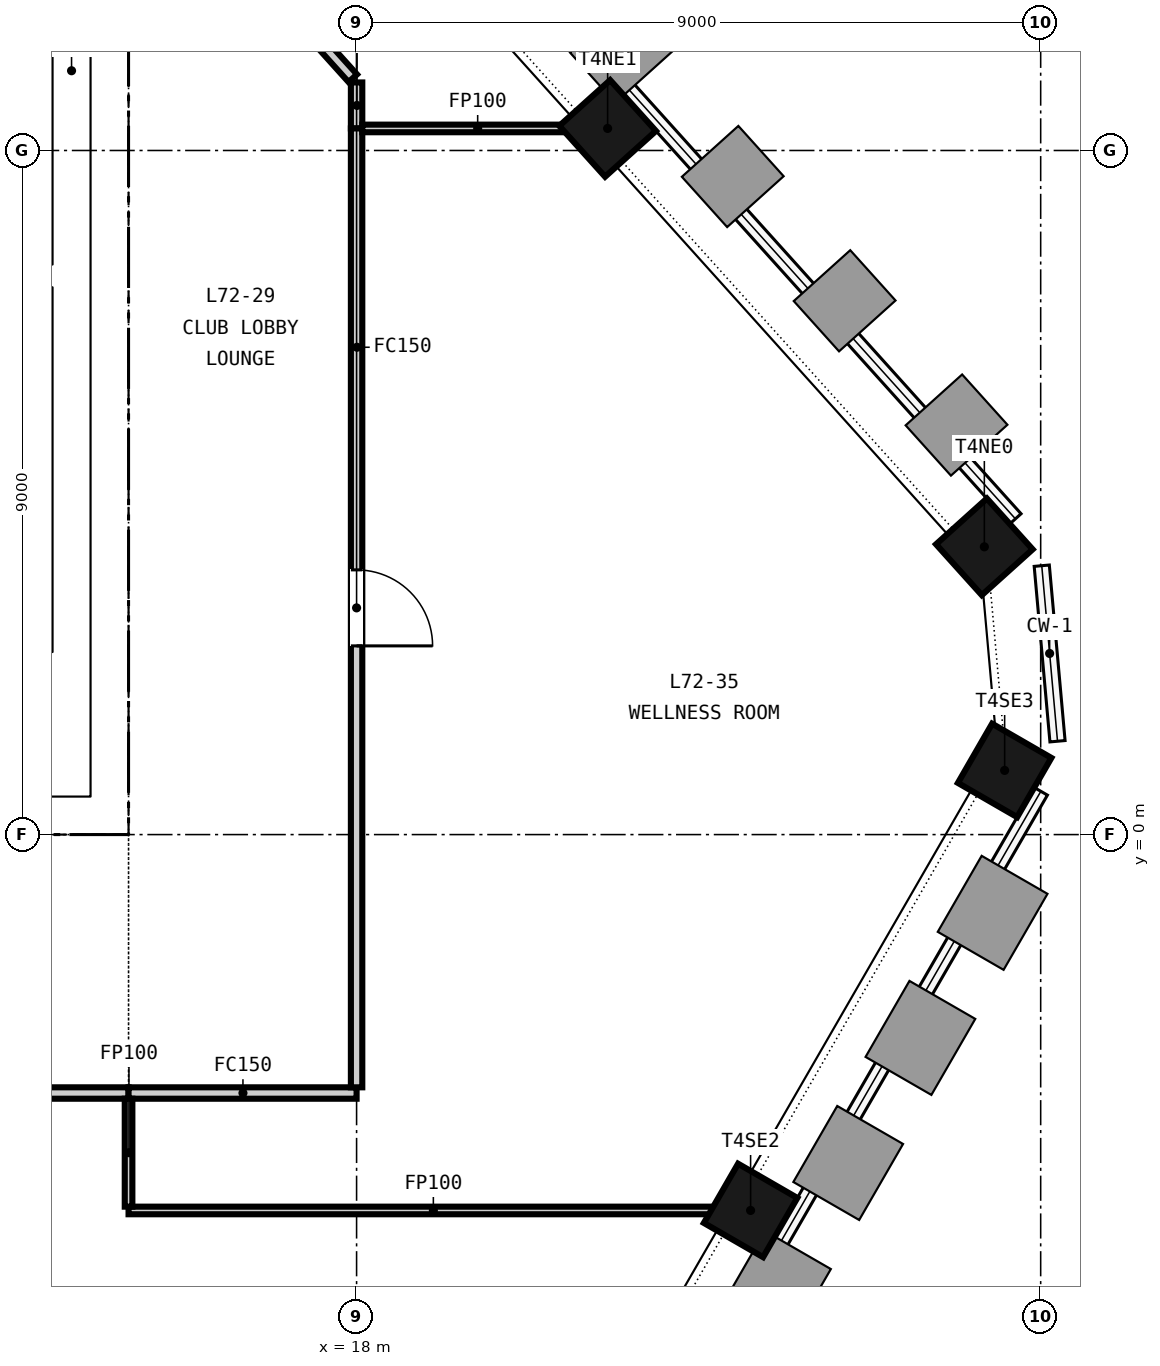
"""IFC4 building model, lengths in metres.
Left out: names, types, materials, properties, quantities, classifications, styles, units other than length and angle.
Written with IfcOpenShell. Run it as: python <this file> out.ifc"""

import sys

from ifc_helpers import new_model, si_unit, direction, frame, frame_2d, origin, origin_2d, place, context, subcontext, project, spatial, rectangle, extrude, element, fill, save


model = new_model("IFC4")
c1 = context("Model", 3, precision=1e-05, world=origin(), true_north=direction((0.0, 1.0)))
c2 = subcontext(c1, "Body", "Model", "MODEL_VIEW")
j1 = project(units=[si_unit("LENGTHUNIT", "METRE"), si_unit("PLANEANGLEUNIT", "RADIAN")], contexts=[c1])
p1 = place(None, origin())
s1 = spatial("IfcSite", under=j1, at=p1, CompositionType="ELEMENT")
p2 = place(p1, origin())
s2 = spatial("IfcBuilding", under=s1, at=p2, CompositionType="ELEMENT")
p3 = place(p2, frame((0.0, 0.0, 282.85)))
s3 = spatial("IfcBuildingStorey", under=s2, at=p3, CompositionType="ELEMENT", Elevation=282.85)
p4 = place(p3, frame((-15.0, 0.25, -0.15), z_axis=(0.0, 0.0, 1.0), x_axis=(1.0, 0.0, 0.0)))
e1 = element("IfcWall", 1, at=p4, inside=s3, PredefinedType="SOLIDWALL", context=c2, shape_type="SweptSolid", body=[
    extrude(rectangle(XDim=30.0, YDim=0.5, at=frame_2d((15.0, 0.0))), origin(), (0.0, 0.0, 1.0), 3.65),
])
p5 = place(p4, frame((5.8, 0.0, 0.15)))
e2 = element("IfcOpeningElement", 2, at=p5, cuts=e1, PredefinedType="OPENING", context=c2, shape_type="SweptSolid", body=[
    extrude(rectangle(XDim=2.4, YDim=2.4, at=frame_2d((1.2, 1.2))), frame((0.0, 0.26, 0.0), z_axis=(0.0, -1.0, 0.0), x_axis=(1.0, 0.0, 0.0)), (0.0, 0.0, 1.0), 0.52),
])
p6 = place(p4, frame((13.8, 0.0, 0.15)))
e3 = element("IfcOpeningElement", 3, at=p6, cuts=e1, PredefinedType="OPENING", context=c2, shape_type="SweptSolid", body=[
    extrude(rectangle(XDim=2.4, YDim=2.4, at=frame_2d((1.2, 1.2))), frame((0.0, 0.26, 0.0), z_axis=(0.0, -1.0, 0.0), x_axis=(1.0, 0.0, 0.0)), (0.0, 0.0, 1.0), 0.52),
])
p7 = place(p4, frame((21.8, 0.0, 0.15)))
e4 = element("IfcOpeningElement", 4, at=p7, cuts=e1, PredefinedType="OPENING", context=c2, shape_type="SweptSolid", body=[
    extrude(rectangle(XDim=2.4, YDim=2.4, at=frame_2d((1.2, 1.2))), frame((0.0, 0.26, 0.0), z_axis=(0.0, -1.0, 0.0), x_axis=(1.0, 0.0, 0.0)), (0.0, 0.0, 1.0), 0.52),
])
p8 = place(p4, frame((1.5, 0.0, 0.15)))
e5 = element("IfcOpeningElement", 5, at=p8, cuts=e1, PredefinedType="OPENING", context=c2, shape_type="SweptSolid", body=[
    extrude(rectangle(XDim=1.2, YDim=2.1, at=frame_2d((0.6, 1.05))), frame((0.0, 0.26, 0.0), z_axis=(0.0, -1.0, 0.0), x_axis=(1.0, 0.0, 0.0)), (0.0, 0.0, 1.0), 0.52),
])
p9 = place(p4, frame((27.3, 0.0, 0.15)))
e6 = element("IfcOpeningElement", 6, at=p9, cuts=e1, PredefinedType="OPENING", context=c2, shape_type="SweptSolid", body=[
    extrude(rectangle(XDim=1.2, YDim=2.1, at=frame_2d((0.6, 1.05))), frame((0.0, 0.26, 0.0), z_axis=(0.0, -1.0, 0.0), x_axis=(1.0, 0.0, 0.0)), (0.0, 0.0, 1.0), 0.52),
])
p10 = place(p3, frame((14.75, 0.5, -0.15), z_axis=(0.0, 0.0, 1.0), x_axis=(0.0, 1.0, 0.0)))
e7 = element("IfcWall", 7, at=p10, inside=s3, PredefinedType="SOLIDWALL", context=c2, shape_type="SweptSolid", body=[
    extrude(rectangle(XDim=14.0, YDim=0.5, at=frame_2d((7.0, 0.0))), origin(), (0.0, 0.0, 1.0), 3.65),
])
for number, where, z_axis, x_axis in (
    (8, (23.184, -4.945, -0.15), (0.0, 0.0, 1.0), (0.5, 0.866, 0.0)),
    (9, (26.526, 0.844, -0.15), (0.0, 0.0, 1.0), (0.5, 0.866, 0.0)),
    (10, (26.259, 3.786, -0.15), (0.0, 0.0, 1.0), (-0.669, 0.743, 0.0)),
    (11, (21.303, 9.29, -0.15), (0.0, 0.0, 1.0), (-0.669, 0.743, 0.0)),
):
    element("IfcColumn", number, at=place(p3, frame(where, z_axis=z_axis, x_axis=x_axis)), inside=s3, PredefinedType="COLUMN", context=c2, shape_type="SweptSolid", body=[
        extrude(rectangle(XDim=0.9, YDim=0.9, at=origin_2d()), origin(), (0.0, 0.0, 1.0), 3.65),
    ])
p11 = place(p3, frame((11.05, 7.35, 0.0), z_axis=(0.0, 0.0, 1.0), x_axis=(1.0, 0.0, 0.0)))
e12 = element("IfcWall", 12, at=p11, inside=s3, PredefinedType="SOLIDWALL", context=c2, shape_type="SweptSolid", body=[
    extrude(rectangle(XDim=2.95, YDim=0.3, at=frame_2d((1.475, 0.0))), origin(), (0.0, 0.0, 1.0), 3.5),
])
p12 = place(p3, frame((14.25, 0.5, 0.0), z_axis=(0.0, 0.0, 1.0), x_axis=(0.0, 1.0, 0.0)))
e13 = element("IfcWall", 13, at=p12, inside=s3, PredefinedType="SOLIDWALL", context=c2, shape_type="SweptSolid", body=[
    extrude(rectangle(XDim=14.0, YDim=0.5, at=frame_2d((7.0, 0.0))), origin(), (0.0, 0.0, 1.0), 3.5),
])
p13 = place(p3, frame((15.0, -3.4, 0.0), z_axis=(0.0, 0.0, 1.0), x_axis=(-1.0, 0.0, 0.0)))
e14 = element("IfcWall", 14, at=p13, inside=s3, PredefinedType="PARTITIONING", context=c2, shape_type="SweptSolid", body=[
    extrude(rectangle(XDim=13.156, YDim=0.15, at=frame_2d((6.578, 0.0))), origin(), (0.0, 0.0, 1.0), 2.75),
])
p14 = place(p13, frame((5.678, 0.0, 0.0)))
e15 = element("IfcOpeningElement", 15, at=p14, cuts=e14, PredefinedType="OPENING", context=c2, shape_type="SweptSolid", body=[
    extrude(rectangle(XDim=1.8, YDim=2.1, at=frame_2d((0.9, 1.05))), frame((0.0, 0.085, 0.0), z_axis=(0.0, -1.0, 0.0), x_axis=(1.0, 0.0, 0.0)), (0.0, 0.0, 1.0), 0.17),
])
p15 = place(p3, frame((18.0, 9.895, 0.0), z_axis=(0.0, 0.0, 1.0), x_axis=(0.0, -1.0, 0.0)))
e16 = element("IfcWall", 16, at=p15, inside=s3, PredefinedType="PARTITIONING", context=c2, shape_type="SweptSolid", body=[
    extrude(rectangle(XDim=0.605, YDim=0.15, at=frame_2d((0.302, 0.0))), origin(), (0.0, 0.0, 1.0), 2.75),
])
p16 = place(p3, frame((18.0, -3.4, 0.0), z_axis=(0.0, 0.0, 1.0), x_axis=(-1.0, 0.0, 0.0)))
e17 = element("IfcWall", 17, at=p16, inside=s3, PredefinedType="PARTITIONING", context=c2, shape_type="SweptSolid", body=[
    extrude(rectangle(XDim=3.0, YDim=0.15, at=frame_2d((1.5, 0.0))), origin(), (0.0, 0.0, 1.0), 2.75),
])
p17 = place(p3, frame((18.0, 9.29, 0.0), z_axis=(0.0, 0.0, 1.0), x_axis=(0.0, -1.0, 0.0)))
e18 = element("IfcWall", 18, at=p17, inside=s3, PredefinedType="PARTITIONING", context=c2, shape_type="SweptSolid", body=[
    extrude(rectangle(XDim=12.615, YDim=0.15, at=frame_2d((6.308, 0.0))), origin(), (0.0, 0.0, 1.0), 2.75),
])
p18 = place(p17, frame((5.808, 0.0, 0.0)))
e19 = element("IfcOpeningElement", 19, at=p18, cuts=e18, PredefinedType="OPENING", context=c2, shape_type="SweptSolid", body=[
    extrude(rectangle(XDim=1.0, YDim=2.1, at=frame_2d((0.5, 1.05))), frame((0.0, 0.085, 0.0), z_axis=(0.0, -1.0, 0.0), x_axis=(1.0, 0.0, 0.0)), (0.0, 0.0, 1.0), 0.17),
])
p19 = place(p3, frame((17.055, 10.944, 0.0), z_axis=(0.0, 0.0, 1.0), x_axis=(0.669065612335, -0.743203341213, 0.0)))
e20 = element("IfcWall", 20, at=p19, inside=s3, PredefinedType="PARTITIONING", context=c2, shape_type="SweptSolid", body=[
    extrude(rectangle(XDim=1.337, YDim=0.15, at=frame_2d((0.668, 0.0))), origin(), (0.0, 0.0, 1.0), 2.75),
])
p20 = place(p3, frame((18.075, 9.29, 0.0), z_axis=(0.0, 0.0, 1.0), x_axis=(1.0, 0.0, 0.0)))
e21 = element("IfcWall", 21, at=p20, inside=s3, PredefinedType="PARTITIONING", context=c2, shape_type="SweptSolid", body=[
    extrude(rectangle(XDim=3.026, YDim=0.1, at=frame_2d((1.513, 0.0))), origin(), (0.0, 0.0, 1.0), 2.75),
])
p21 = place(p3, frame((15.0, -4.945, 0.0), z_axis=(0.0, 0.0, 1.0), x_axis=(1.0, 0.0, 0.0)))
e22 = element("IfcWall", 22, at=p21, inside=s3, PredefinedType="PARTITIONING", context=c2, shape_type="SweptSolid", body=[
    extrude(rectangle(XDim=8.01, YDim=0.1, at=frame_2d((4.005, 0.0))), origin(), (0.0, 0.0, 1.0), 2.75),
])
p22 = place(p3, frame((15.0, -4.895, 0.0), z_axis=(0.0, 0.0, 1.0), x_axis=(0.0, 1.0, 0.0)))
e23 = element("IfcWall", 23, at=p22, inside=s3, PredefinedType="PARTITIONING", context=c2, shape_type="SweptSolid", body=[
    extrude(rectangle(XDim=1.42, YDim=0.1, at=frame_2d((0.71, 0.0))), origin(), (0.0, 0.0, 1.0), 2.75),
])
p23 = place(p18, origin())
e24 = element("IfcDoor", 24, at=p23, inside=s3, OperationType="SINGLE_SWING_RIGHT", PredefinedType="DOOR", context=c2, shape_type="SweptSolid", body=[
    extrude(rectangle(XDim=1.0, YDim=2.1, at=frame_2d((0.5, 1.05))), frame((0.0, 0.025, 0.0), z_axis=(0.0, -1.0, 0.0), x_axis=(1.0, 0.0, 0.0)), (0.0, 0.0, 1.0), 0.05),
])
fill(e19, e24)
save(model, sys.argv[1])
